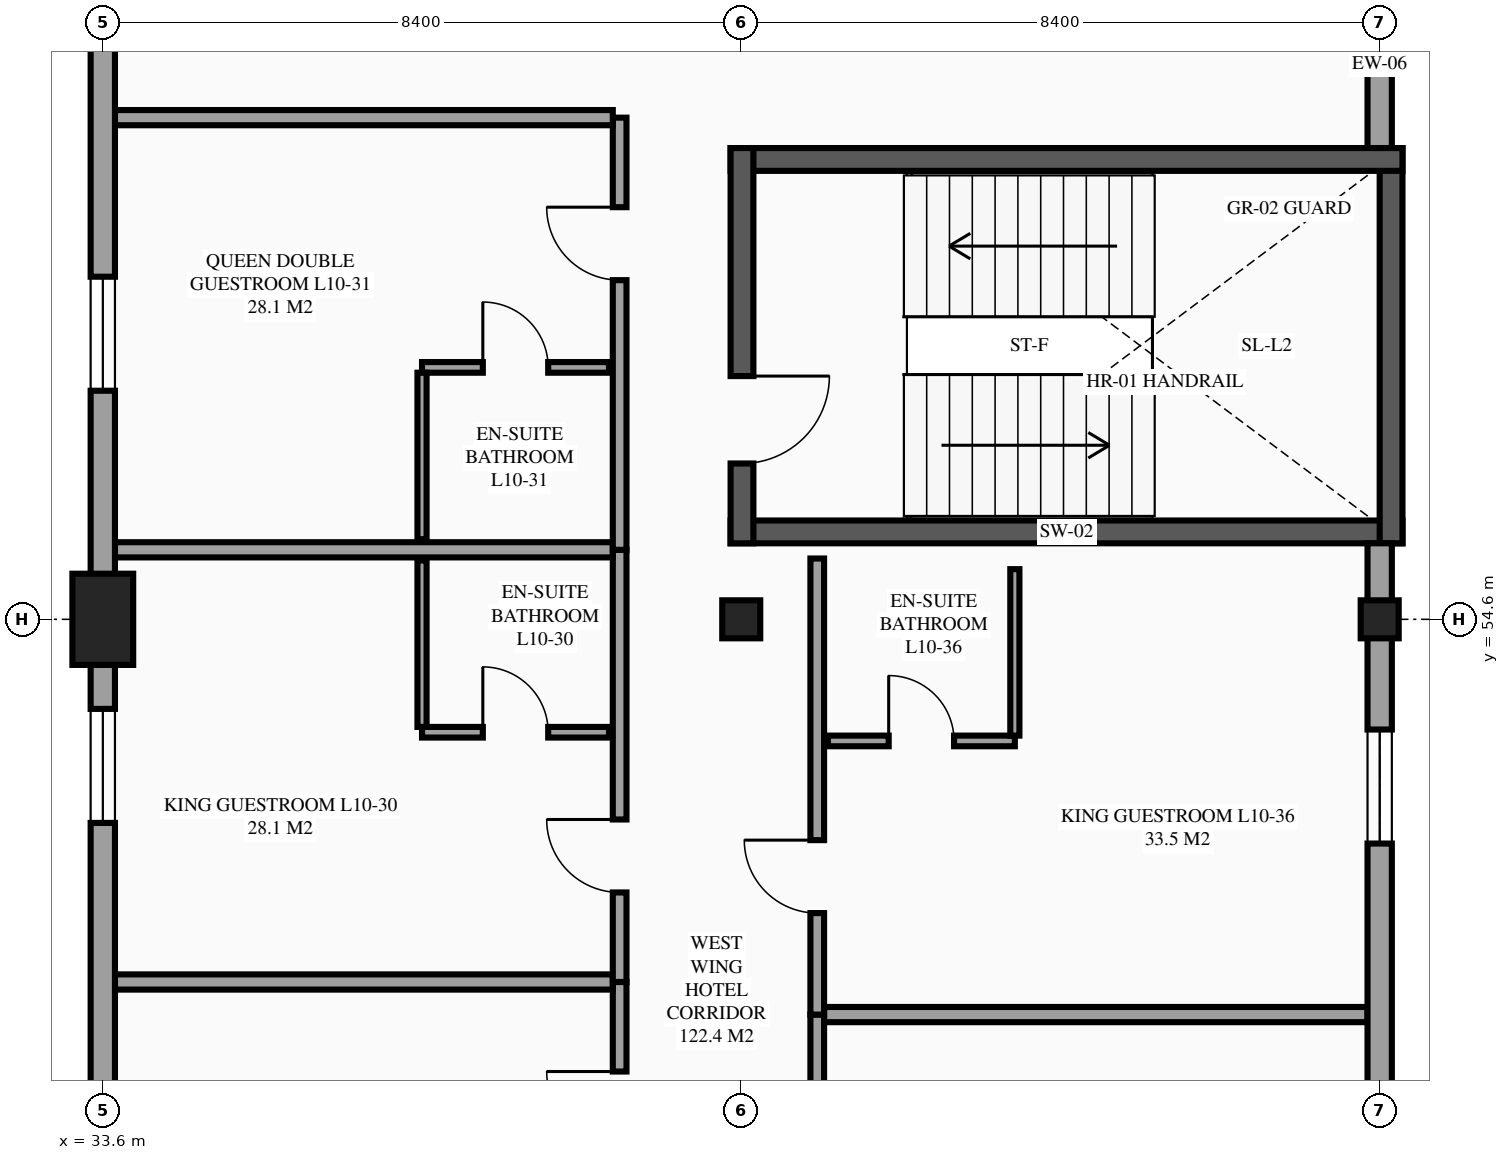
"""IFC4 building model, lengths in metres.
Left out: names, types, materials, properties, quantities, classifications, styles, units other than length and angle.
Written with IfcOpenShell. Run it as: python <this file> out.ifc"""

import sys

from ifc_helpers import new_model, si_unit, direction, frame, frame_2d, origin, origin_2d, place, context, subcontext, project, spatial, rectangle, extrude, element, fill, save


model = new_model("IFC4")
c1 = context("Model", 3, precision=1e-05, world=origin(), true_north=direction((0.0, 1.0)))
c2 = subcontext(c1, "Body", "Model", "MODEL_VIEW")
j1 = project(units=[si_unit("LENGTHUNIT", "METRE"), si_unit("PLANEANGLEUNIT", "RADIAN")], contexts=[c1])
p1 = place(None, origin())
s1 = spatial("IfcSite", under=j1, at=p1, CompositionType="ELEMENT")
p2 = place(p1, origin())
s2 = spatial("IfcBuilding", under=s1, at=p2, CompositionType="ELEMENT")
p3 = place(p2, frame((0.0, 0.0, 39.9)))
s3 = spatial("IfcBuildingStorey", under=s2, at=p3, CompositionType="ELEMENT", Elevation=39.9)
p4 = place(p3, frame((33.6, 54.6, 0.0), z_axis=(0.0, 0.0, 1.0), x_axis=(1.0, 0.0, 0.0)))
e1 = element("IfcColumn", 1, at=p4, inside=s3, PredefinedType="COLUMN", context=c2, shape_type="SweptSolid", body=[
    extrude(rectangle(XDim=0.8, YDim=1.2, at=origin_2d()), origin(), (0.0, 0.0, 1.0), 3.6),
])
for number, where, z_axis, x_axis in (
    (2, (42.0, 54.6, 0.0), (0.0, 0.0, 1.0), (1.0, 0.0, 0.0)),
    (3, (50.4, 54.6, 0.0), (0.0, 0.0, 1.0), (1.0, 0.0, 0.0)),
):
    element("IfcColumn", number, at=place(p3, frame(where, z_axis=z_axis, x_axis=x_axis)), inside=s3, PredefinedType="COLUMN", context=c2, shape_type="SweptSolid", body=[
        extrude(rectangle(XDim=0.5, YDim=0.5, at=origin_2d()), origin(), (0.0, 0.0, 1.0), 3.6),
    ])
p5 = place(p3, frame((50.4, 60.8, 0.0), z_axis=(0.0, 0.0, 1.0), x_axis=(0.0, 1.0, 0.0)))
e4 = element("IfcWall", 4, at=p5, inside=s3, PredefinedType="STANDARD", context=c2, shape_type="SweptSolid", body=[
    extrude(rectangle(XDim=2.2, YDim=0.32, at=frame_2d((1.1, 0.0))), origin(), (0.0, 0.0, 1.0), 2.63),
])
p6 = place(p3, frame((41.86, 55.75, 0.0), z_axis=(0.0, 0.0, 1.0), x_axis=(1.0, 0.0, 0.0)))
e5 = element("IfcWall", 5, at=p6, inside=s3, PredefinedType="SHEAR", context=c2, shape_type="SweptSolid", body=[
    extrude(rectangle(XDim=8.84, YDim=0.3, at=frame_2d((4.42, 0.0))), origin(), (0.0, 0.0, 1.0), 3.6),
])
p7 = place(p3, frame((50.55, 55.6, 0.0), z_axis=(0.0, 0.0, 1.0), x_axis=(0.0, 1.0, 0.0)))
e6 = element("IfcWall", 6, at=p7, inside=s3, PredefinedType="SHEAR", context=c2, shape_type="SweptSolid", body=[
    extrude(rectangle(XDim=5.2, YDim=0.3, at=frame_2d((2.6, 0.0))), origin(), (0.0, 0.0, 1.0), 3.6),
])
p8 = place(p3, frame((50.7, 60.65, 0.0), z_axis=(0.0, 0.0, 1.0), x_axis=(-1.0, 0.0, 0.0)))
e7 = element("IfcWall", 7, at=p8, inside=s3, PredefinedType="SHEAR", context=c2, shape_type="SweptSolid", body=[
    extrude(rectangle(XDim=8.84, YDim=0.3, at=frame_2d((4.42, 0.0))), origin(), (0.0, 0.0, 1.0), 3.6),
])
p9 = place(p3, frame((42.01, 60.8, 0.0), z_axis=(0.0, 0.0, 1.0), x_axis=(0.0, -1.0, 0.0)))
e8 = element("IfcWall", 8, at=p9, inside=s3, PredefinedType="SHEAR", context=c2, shape_type="SweptSolid", body=[
    extrude(rectangle(XDim=5.2, YDim=0.3, at=frame_2d((2.6, 0.0))), origin(), (0.0, 0.0, 1.0), 3.6),
])
p10 = place(p9, frame((3.0, 0.0, 0.0)))
e9 = element("IfcOpeningElement", 9, at=p10, cuts=e8, PredefinedType="OPENING", context=c2, shape_type="SweptSolid", body=[
    extrude(rectangle(XDim=1.15, YDim=2.15, at=frame_2d((0.575, 1.075))), frame((0.0, 0.16, 0.0), z_axis=(0.0, -1.0, 0.0), x_axis=(1.0, 0.0, 0.0)), (0.0, 0.0, 1.0), 0.32),
])
p11 = place(p3, frame((40.4, 44.143, 0.0), z_axis=(0.0, 0.0, 1.0), x_axis=(0.0, 1.0, 0.0)))
e10 = element("IfcWall", 10, at=p11, inside=s3, PredefinedType="PARTITIONING", context=c2, shape_type="SweptSolid", body=[
    extrude(rectangle(XDim=5.686, YDim=0.18, at=frame_2d((2.843, 0.0))), origin(), (0.0, 0.0, 1.0), 3.375),
])
p12 = place(p11, frame((3.548, 0.0, 0.0)))
e11 = element("IfcOpeningElement", 11, at=p12, cuts=e10, PredefinedType="OPENING", context=c2, shape_type="SweptSolid", body=[
    extrude(rectangle(XDim=0.96, YDim=2.15, at=frame_2d((0.48, 1.075))), frame((0.0, 0.1, 0.0), z_axis=(0.0, -1.0, 0.0), x_axis=(1.0, 0.0, 0.0)), (0.0, 0.0, 1.0), 0.2),
])
p13 = place(p3, frame((33.76, 49.829, 0.0), z_axis=(0.0, 0.0, 1.0), x_axis=(1.0, 0.0, 0.0)))
e12 = element("IfcWall", 12, at=p13, inside=s3, PredefinedType="PARTITIONING", context=c2, shape_type="SweptSolid", body=[
    extrude(rectangle(XDim=6.55, YDim=0.2, at=frame_2d((3.275, 0.0))), origin(), (0.0, 0.0, 1.0), 3.375),
])
p14 = place(p3, frame((40.4, 49.829, 0.0), z_axis=(0.0, 0.0, 1.0), x_axis=(0.0, 1.0, 0.0)))
e13 = element("IfcWall", 13, at=p14, inside=s3, PredefinedType="PARTITIONING", context=c2, shape_type="SweptSolid", body=[
    extrude(rectangle(XDim=5.686, YDim=0.18, at=frame_2d((2.843, 0.0))), origin(), (0.0, 0.0, 1.0), 3.375),
])
p15 = place(p14, frame((1.178, 0.0, 0.0)))
e14 = element("IfcOpeningElement", 14, at=p15, cuts=e13, PredefinedType="OPENING", context=c2, shape_type="SweptSolid", body=[
    extrude(rectangle(XDim=0.96, YDim=2.15, at=frame_2d((0.48, 1.075))), frame((0.0, 0.1, 0.0), z_axis=(0.0, -1.0, 0.0), x_axis=(1.0, 0.0, 0.0)), (0.0, 0.0, 1.0), 0.2),
])
p16 = place(p3, frame((33.76, 55.514, 0.0), z_axis=(0.0, 0.0, 1.0), x_axis=(1.0, 0.0, 0.0)))
e15 = element("IfcWall", 15, at=p16, inside=s3, PredefinedType="PARTITIONING", context=c2, shape_type="SweptSolid", body=[
    extrude(rectangle(XDim=6.55, YDim=0.2, at=frame_2d((3.275, 0.0))), origin(), (0.0, 0.0, 1.0), 3.375),
])
p17 = place(p3, frame((37.8, 53.114, 0.0), z_axis=(0.0, 0.0, 1.0), x_axis=(1.0, 0.0, 0.0)))
e16 = element("IfcWall", 16, at=p17, inside=s3, PredefinedType="PARTITIONING", context=c2, shape_type="SweptSolid", body=[
    extrude(rectangle(XDim=2.46, YDim=0.14, at=frame_2d((1.23, 0.0))), origin(), (0.0, 0.0, 1.0), 3.375),
])
p18 = place(p17, frame((0.8, 0.0, 0.0)))
e17 = element("IfcOpeningElement", 17, at=p18, cuts=e16, PredefinedType="OPENING", context=c2, shape_type="SweptSolid", body=[
    extrude(rectangle(XDim=0.86, YDim=2.1, at=frame_2d((0.43, 1.05))), frame((0.0, 0.08, 0.0), z_axis=(0.0, -1.0, 0.0), x_axis=(1.0, 0.0, 0.0)), (0.0, 0.0, 1.0), 0.16),
])
p19 = place(p3, frame((37.8, 53.184, 0.0), z_axis=(0.0, 0.0, 1.0), x_axis=(0.0, 1.0, 0.0)))
e18 = element("IfcWall", 18, at=p19, inside=s3, PredefinedType="PARTITIONING", context=c2, shape_type="SweptSolid", body=[
    extrude(rectangle(XDim=2.19, YDim=0.12, at=frame_2d((1.095, 0.0))), origin(), (0.0, 0.0, 1.0), 3.375),
])
p20 = place(p3, frame((40.4, 55.514, 0.0), z_axis=(0.0, 0.0, 1.0), x_axis=(0.0, 1.0, 0.0)))
e19 = element("IfcWall", 19, at=p20, inside=s3, PredefinedType="PARTITIONING", context=c2, shape_type="SweptSolid", body=[
    extrude(rectangle(XDim=5.686, YDim=0.18, at=frame_2d((2.843, 0.0))), origin(), (0.0, 0.0, 1.0), 3.375),
])
p21 = place(p20, frame((3.548, 0.0, 0.0)))
e20 = element("IfcOpeningElement", 20, at=p21, cuts=e19, PredefinedType="OPENING", context=c2, shape_type="SweptSolid", body=[
    extrude(rectangle(XDim=0.96, YDim=2.15, at=frame_2d((0.48, 1.075))), frame((0.0, 0.1, 0.0), z_axis=(0.0, -1.0, 0.0), x_axis=(1.0, 0.0, 0.0)), (0.0, 0.0, 1.0), 0.2),
])
p22 = place(p3, frame((33.76, 61.2, 0.0), z_axis=(0.0, 0.0, 1.0), x_axis=(1.0, 0.0, 0.0)))
e21 = element("IfcWall", 21, at=p22, inside=s3, PredefinedType="PARTITIONING", context=c2, shape_type="SweptSolid", body=[
    extrude(rectangle(XDim=6.55, YDim=0.2, at=frame_2d((3.275, 0.0))), origin(), (0.0, 0.0, 1.0), 3.375),
])
p23 = place(p3, frame((37.8, 57.914, 0.0), z_axis=(0.0, 0.0, 1.0), x_axis=(1.0, 0.0, 0.0)))
e22 = element("IfcWall", 22, at=p23, inside=s3, PredefinedType="PARTITIONING", context=c2, shape_type="SweptSolid", body=[
    extrude(rectangle(XDim=2.46, YDim=0.14, at=frame_2d((1.23, 0.0))), origin(), (0.0, 0.0, 1.0), 3.375),
])
p24 = place(p23, frame((0.8, 0.0, 0.0)))
e23 = element("IfcOpeningElement", 23, at=p24, cuts=e22, PredefinedType="OPENING", context=c2, shape_type="SweptSolid", body=[
    extrude(rectangle(XDim=0.86, YDim=2.1, at=frame_2d((0.43, 1.05))), frame((0.0, 0.08, 0.0), z_axis=(0.0, -1.0, 0.0), x_axis=(1.0, 0.0, 0.0)), (0.0, 0.0, 1.0), 0.16),
])
p25 = place(p3, frame((37.8, 55.654, 0.0), z_axis=(0.0, 0.0, 1.0), x_axis=(0.0, 1.0, 0.0)))
e24 = element("IfcWall", 24, at=p25, inside=s3, PredefinedType="PARTITIONING", context=c2, shape_type="SweptSolid", body=[
    extrude(rectangle(XDim=2.19, YDim=0.12, at=frame_2d((1.095, 0.0))), origin(), (0.0, 0.0, 1.0), 3.375),
])
p26 = place(p3, frame((43.0, 43.4, 0.0), z_axis=(0.0, 0.0, 1.0), x_axis=(0.0, 1.0, 0.0)))
e25 = element("IfcWall", 25, at=p26, inside=s3, PredefinedType="PARTITIONING", context=c2, shape_type="SweptSolid", body=[
    extrude(rectangle(XDim=6.0, YDim=0.18, at=frame_2d((3.0, 0.0))), origin(), (0.0, 0.0, 1.0), 3.375),
])
p27 = place(p26, frame((4.055, 0.0, 0.0)))
e26 = element("IfcOpeningElement", 26, at=p27, cuts=e25, PredefinedType="OPENING", context=c2, shape_type="SweptSolid", body=[
    extrude(rectangle(XDim=0.96, YDim=2.15, at=frame_2d((0.48, 1.075))), frame((0.0, 0.1, 0.0), z_axis=(0.0, -1.0, 0.0), x_axis=(1.0, 0.0, 0.0)), (0.0, 0.0, 1.0), 0.2),
])
p28 = place(p3, frame((43.09, 49.4, 0.0), z_axis=(0.0, 0.0, 1.0), x_axis=(1.0, 0.0, 0.0)))
e27 = element("IfcWall", 27, at=p28, inside=s3, PredefinedType="PARTITIONING", context=c2, shape_type="SweptSolid", body=[
    extrude(rectangle(XDim=7.15, YDim=0.2, at=frame_2d((3.575, 0.0))), origin(), (0.0, 0.0, 1.0), 3.375),
])
p29 = place(p3, frame((43.0, 49.4, 0.0), z_axis=(0.0, 0.0, 1.0), x_axis=(0.0, 1.0, 0.0)))
e28 = element("IfcWall", 28, at=p29, inside=s3, PredefinedType="PARTITIONING", context=c2, shape_type="SweptSolid", body=[
    extrude(rectangle(XDim=6.0, YDim=0.18, at=frame_2d((3.0, 0.0))), origin(), (0.0, 0.0, 1.0), 3.375),
])
p30 = place(p29, frame((1.335, 0.0, 0.0)))
e29 = element("IfcOpeningElement", 29, at=p30, cuts=e28, PredefinedType="OPENING", context=c2, shape_type="SweptSolid", body=[
    extrude(rectangle(XDim=0.96, YDim=2.15, at=frame_2d((0.48, 1.075))), frame((0.0, 0.1, 0.0), z_axis=(0.0, -1.0, 0.0), x_axis=(1.0, 0.0, 0.0)), (0.0, 0.0, 1.0), 0.2),
])
p31 = place(p3, frame((43.14, 53.0, 0.0), z_axis=(0.0, 0.0, 1.0), x_axis=(1.0, 0.0, 0.0)))
e30 = element("IfcWall", 30, at=p31, inside=s3, PredefinedType="PARTITIONING", context=c2, shape_type="SweptSolid", body=[
    extrude(rectangle(XDim=2.46, YDim=0.14, at=frame_2d((1.23, 0.0))), origin(), (0.0, 0.0, 1.0), 3.375),
])
p32 = place(p31, frame((0.8, 0.0, 0.0)))
e31 = element("IfcOpeningElement", 31, at=p32, cuts=e30, PredefinedType="OPENING", context=c2, shape_type="SweptSolid", body=[
    extrude(rectangle(XDim=0.86, YDim=2.1, at=frame_2d((0.43, 1.05))), frame((0.0, 0.08, 0.0), z_axis=(0.0, -1.0, 0.0), x_axis=(1.0, 0.0, 0.0)), (0.0, 0.0, 1.0), 0.16),
])
p33 = place(p3, frame((45.6, 53.07, 0.0), z_axis=(0.0, 0.0, 1.0), x_axis=(0.0, 1.0, 0.0)))
e32 = element("IfcWall", 32, at=p33, inside=s3, PredefinedType="PARTITIONING", context=c2, shape_type="SweptSolid", body=[
    extrude(rectangle(XDim=2.19, YDim=0.12, at=frame_2d((1.095, 0.0))), origin(), (0.0, 0.0, 1.0), 3.375),
])
p34 = place(p3, frame((50.4, 46.2, 0.0), z_axis=(0.0, 0.0, 1.0), x_axis=(0.0, 1.0, 0.0)))
e33 = element("IfcWall", 33, at=p34, inside=s3, PredefinedType="STANDARD", context=c2, shape_type="SweptSolid", body=[
    extrude(rectangle(XDim=8.4, YDim=0.32, at=frame_2d((4.2, 0.0))), origin(), (0.0, 0.0, 1.0), 3.126),
])
p35 = place(p34, frame((0.85, 0.0, 0.85)))
e34 = element("IfcOpeningElement", 34, at=p35, cuts=e33, PredefinedType="OPENING", context=c2, shape_type="SweptSolid", body=[
    extrude(rectangle(XDim=1.2, YDim=1.5, at=frame_2d((0.6, 0.75))), frame((0.0, 0.17, 0.0), z_axis=(0.0, -1.0, 0.0), x_axis=(1.0, 0.0, 0.0)), (0.0, 0.0, 1.0), 0.34),
])
p36 = place(p34, frame((5.45, 0.0, 0.85)))
e35 = element("IfcOpeningElement", 35, at=p36, cuts=e33, PredefinedType="OPENING", context=c2, shape_type="SweptSolid", body=[
    extrude(rectangle(XDim=1.5, YDim=1.5, at=frame_2d((0.75, 0.75))), frame((0.0, 0.17, 0.0), z_axis=(0.0, -1.0, 0.0), x_axis=(1.0, 0.0, 0.0)), (0.0, 0.0, 1.0), 0.34),
])
p37 = place(p3, frame((50.4, 54.6, 0.0), z_axis=(0.0, 0.0, 1.0), x_axis=(0.0, 1.0, 0.0)))
e36 = element("IfcWall", 36, at=p37, inside=s3, PredefinedType="STANDARD", context=c2, shape_type="SweptSolid", body=[
    extrude(rectangle(XDim=1.0, YDim=0.32, at=frame_2d((0.5, 0.0))), origin(), (0.0, 0.0, 1.0), 2.63),
])
p38 = place(p3, frame((33.6, 63.0, 0.0), z_axis=(0.0, 0.0, 1.0), x_axis=(0.0, -1.0, 0.0)))
e37 = element("IfcWall", 37, at=p38, inside=s3, PredefinedType="STANDARD", context=c2, shape_type="SweptSolid", body=[
    extrude(rectangle(XDim=8.4, YDim=0.32, at=frame_2d((4.2, 0.0))), origin(), (0.0, 0.0, 1.0), 2.53),
])
p39 = place(p38, frame((3.893, 0.0, 0.85)))
e38 = element("IfcOpeningElement", 38, at=p39, cuts=e37, PredefinedType="OPENING", context=c2, shape_type="SweptSolid", body=[
    extrude(rectangle(XDim=1.5, YDim=1.5, at=frame_2d((0.75, 0.75))), frame((0.0, 0.17, 0.0), z_axis=(0.0, -1.0, 0.0), x_axis=(1.0, 0.0, 0.0)), (0.0, 0.0, 1.0), 0.34),
])
p40 = place(p3, frame((33.6, 54.6, 0.0), z_axis=(0.0, 0.0, 1.0), x_axis=(0.0, -1.0, 0.0)))
e39 = element("IfcWall", 39, at=p40, inside=s3, PredefinedType="STANDARD", context=c2, shape_type="SweptSolid", body=[
    extrude(rectangle(XDim=8.4, YDim=0.32, at=frame_2d((4.2, 0.0))), origin(), (0.0, 0.0, 1.0), 2.43),
])
p41 = place(p40, frame((6.114, 0.0, 0.85)))
e40 = element("IfcOpeningElement", 40, at=p41, cuts=e39, PredefinedType="OPENING", context=c2, shape_type="SweptSolid", body=[
    extrude(rectangle(XDim=1.5, YDim=1.5, at=frame_2d((0.75, 0.75))), frame((0.0, 0.17, 0.0), z_axis=(0.0, -1.0, 0.0), x_axis=(1.0, 0.0, 0.0)), (0.0, 0.0, 1.0), 0.34),
])
p42 = place(p40, frame((1.178, 0.0, 0.85)))
e41 = element("IfcOpeningElement", 41, at=p42, cuts=e39, PredefinedType="OPENING", context=c2, shape_type="SweptSolid", body=[
    extrude(rectangle(XDim=1.5, YDim=1.5, at=frame_2d((0.75, 0.75))), frame((0.0, 0.17, 0.0), z_axis=(0.0, -1.0, 0.0), x_axis=(1.0, 0.0, 0.0)), (0.0, 0.0, 1.0), 0.34),
])
p43 = place(p42, origin())
e42 = element("IfcWindow", 42, at=p43, inside=s3, PartitioningType="SINGLE_PANEL", PredefinedType="WINDOW", context=c2, shape_type="SweptSolid", body=[
    extrude(rectangle(XDim=1.5, YDim=1.5, at=frame_2d((0.75, 0.75))), frame((0.0, 0.03, 0.0), z_axis=(0.0, -1.0, 0.0), x_axis=(1.0, 0.0, 0.0)), (0.0, 0.0, 1.0), 0.06),
])
fill(e41, e42)
p44 = place(p39, origin())
e43 = element("IfcWindow", 43, at=p44, inside=s3, PartitioningType="SINGLE_PANEL", PredefinedType="WINDOW", context=c2, shape_type="SweptSolid", body=[
    extrude(rectangle(XDim=1.5, YDim=1.5, at=frame_2d((0.75, 0.75))), frame((0.0, 0.03, 0.0), z_axis=(0.0, -1.0, 0.0), x_axis=(1.0, 0.0, 0.0)), (0.0, 0.0, 1.0), 0.06),
])
fill(e38, e43)
p45 = place(p36, origin())
e44 = element("IfcWindow", 44, at=p45, inside=s3, PartitioningType="SINGLE_PANEL", PredefinedType="WINDOW", context=c2, shape_type="SweptSolid", body=[
    extrude(rectangle(XDim=1.5, YDim=1.5, at=frame_2d((0.75, 0.75))), frame((0.0, 0.03, 0.0), z_axis=(0.0, -1.0, 0.0), x_axis=(1.0, 0.0, 0.0)), (0.0, 0.0, 1.0), 0.06),
])
fill(e35, e44)
p46 = place(p10, origin())
e45 = element("IfcDoor", 45, at=p46, inside=s3, OperationType="SINGLE_SWING_LEFT", PredefinedType="DOOR", context=c2, shape_type="SweptSolid", body=[
    extrude(rectangle(XDim=1.15, YDim=2.15, at=frame_2d((0.575, 1.075))), frame((0.0, 0.025, 0.0), z_axis=(0.0, -1.0, 0.0), x_axis=(1.0, 0.0, 0.0)), (0.0, 0.0, 1.0), 0.05),
])
fill(e9, e45)
p47 = place(p12, origin())
e46 = element("IfcDoor", 46, at=p47, inside=s3, OperationType="SINGLE_SWING_RIGHT", PredefinedType="DOOR", context=c2, shape_type="SweptSolid", body=[
    extrude(rectangle(XDim=0.96, YDim=2.15, at=frame_2d((0.48, 1.075))), frame((0.0, 0.025, 0.0), z_axis=(0.0, -1.0, 0.0), x_axis=(1.0, 0.0, 0.0)), (0.0, 0.0, 1.0), 0.05),
])
fill(e11, e46)
p48 = place(p15, origin())
e47 = element("IfcDoor", 47, at=p48, inside=s3, OperationType="SINGLE_SWING_RIGHT", PredefinedType="DOOR", context=c2, shape_type="SweptSolid", body=[
    extrude(rectangle(XDim=0.96, YDim=2.15, at=frame_2d((0.48, 1.075))), frame((0.0, 0.025, 0.0), z_axis=(0.0, -1.0, 0.0), x_axis=(1.0, 0.0, 0.0)), (0.0, 0.0, 1.0), 0.05),
])
fill(e14, e47)
p49 = place(p18, origin())
e48 = element("IfcDoor", 48, at=p49, inside=s3, OperationType="SINGLE_SWING_LEFT", PredefinedType="DOOR", context=c2, shape_type="SweptSolid", body=[
    extrude(rectangle(XDim=0.86, YDim=2.1, at=frame_2d((0.43, 1.05))), frame((0.0, 0.025, 0.0), z_axis=(0.0, -1.0, 0.0), x_axis=(1.0, 0.0, 0.0)), (0.0, 0.0, 1.0), 0.05),
])
fill(e17, e48)
p50 = place(p21, origin())
e49 = element("IfcDoor", 49, at=p50, inside=s3, OperationType="SINGLE_SWING_RIGHT", PredefinedType="DOOR", context=c2, shape_type="SweptSolid", body=[
    extrude(rectangle(XDim=0.96, YDim=2.15, at=frame_2d((0.48, 1.075))), frame((0.0, 0.025, 0.0), z_axis=(0.0, -1.0, 0.0), x_axis=(1.0, 0.0, 0.0)), (0.0, 0.0, 1.0), 0.05),
])
fill(e20, e49)
p51 = place(p24, origin())
e50 = element("IfcDoor", 50, at=p51, inside=s3, OperationType="SINGLE_SWING_LEFT", PredefinedType="DOOR", context=c2, shape_type="SweptSolid", body=[
    extrude(rectangle(XDim=0.86, YDim=2.1, at=frame_2d((0.43, 1.05))), frame((0.0, 0.025, 0.0), z_axis=(0.0, -1.0, 0.0), x_axis=(1.0, 0.0, 0.0)), (0.0, 0.0, 1.0), 0.05),
])
fill(e23, e50)
p52 = place(p30, origin())
e51 = element("IfcDoor", 51, at=p52, inside=s3, OperationType="SINGLE_SWING_RIGHT", PredefinedType="DOOR", context=c2, shape_type="SweptSolid", body=[
    extrude(rectangle(XDim=0.96, YDim=2.15, at=frame_2d((0.48, 1.075))), frame((0.0, 0.025, 0.0), z_axis=(0.0, -1.0, 0.0), x_axis=(1.0, 0.0, 0.0)), (0.0, 0.0, 1.0), 0.05),
])
fill(e29, e51)
p53 = place(p32, origin())
e52 = element("IfcDoor", 52, at=p53, inside=s3, OperationType="SINGLE_SWING_LEFT", PredefinedType="DOOR", context=c2, shape_type="SweptSolid", body=[
    extrude(rectangle(XDim=0.86, YDim=2.1, at=frame_2d((0.43, 1.05))), frame((0.0, 0.025, 0.0), z_axis=(0.0, -1.0, 0.0), x_axis=(1.0, 0.0, 0.0)), (0.0, 0.0, 1.0), 0.05),
])
fill(e31, e52)
save(model, sys.argv[1])
